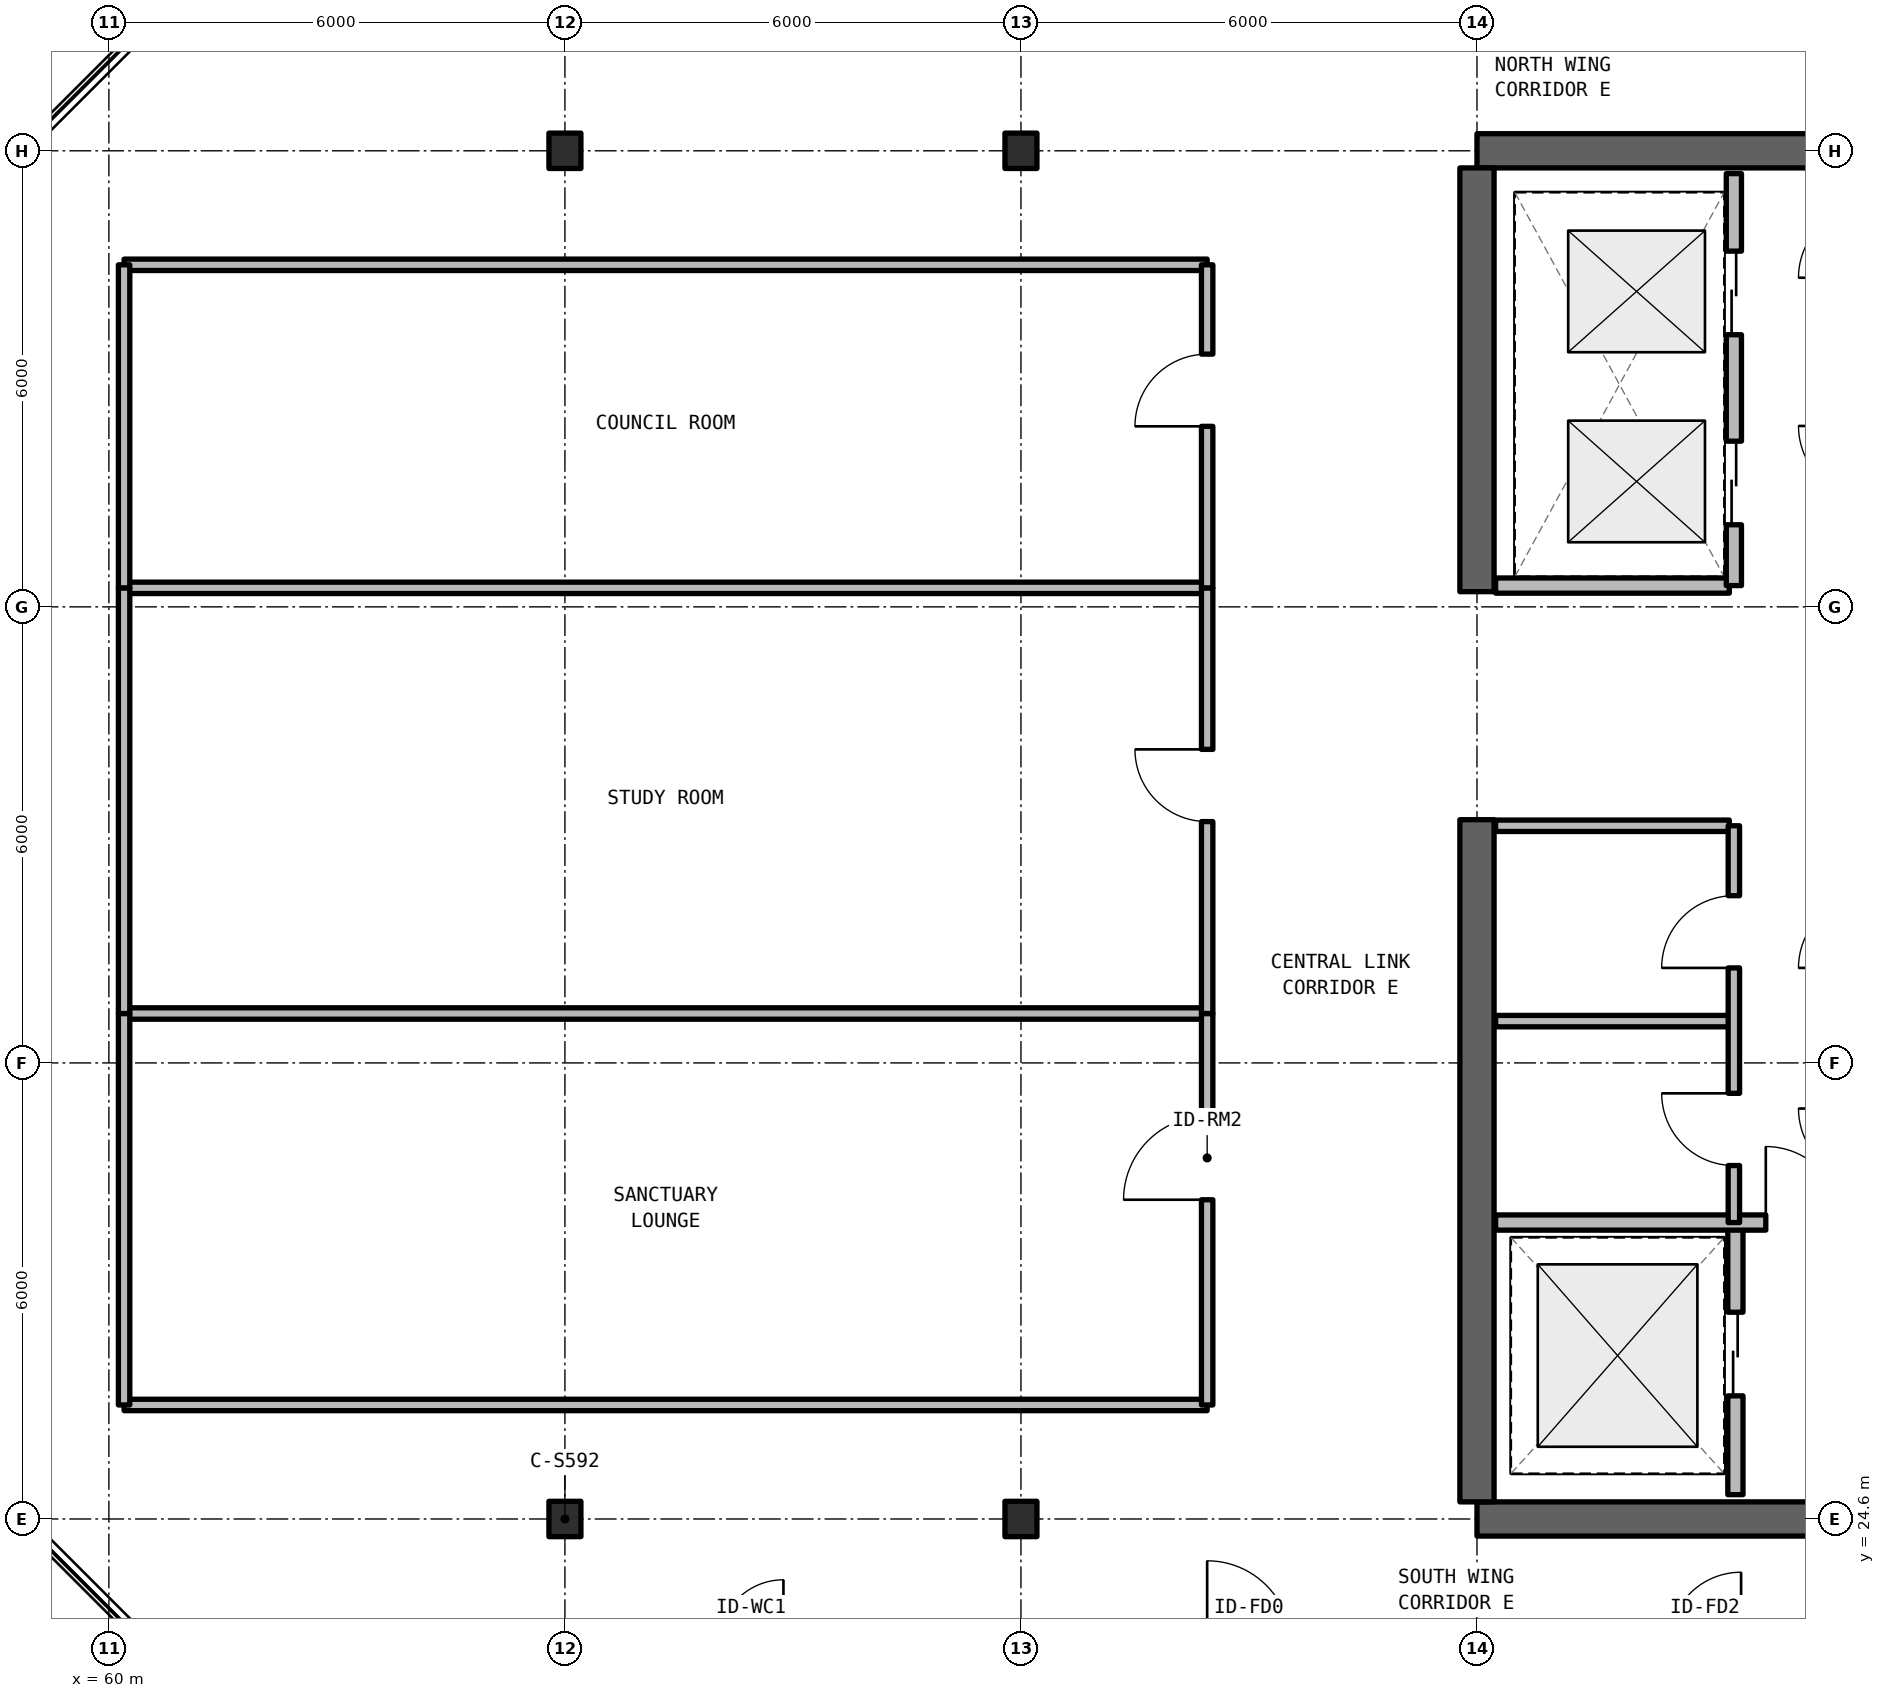
"""IFC4 building model, lengths in metres.
Left out: names, types, materials, properties, quantities, classifications, styles, units other than length and angle.
Written with IfcOpenShell. Run it as: python <this file> out.ifc"""

import sys

from ifc_helpers import new_model, si_unit, direction, frame, frame_2d, origin, origin_2d, place, context, subcontext, project, spatial, rectangle, i_section, extrude, element, fill, save


model = new_model("IFC4")
c1 = context("Model", 3, precision=1e-05, world=origin(), true_north=direction((0.0, 1.0)))
c2 = subcontext(c1, "Body", "Model", "MODEL_VIEW")
j1 = project(units=[si_unit("LENGTHUNIT", "METRE"), si_unit("PLANEANGLEUNIT", "RADIAN")], contexts=[c1])
p1 = place(None, origin())
s1 = spatial("IfcSite", under=j1, at=p1, CompositionType="ELEMENT")
p2 = place(p1, origin())
s2 = spatial("IfcBuilding", under=s1, at=p2, CompositionType="ELEMENT")
p3 = place(p2, frame((0.0, 0.0, 267.96)))
s3 = spatial("IfcBuildingStorey", under=s2, at=p3, CompositionType="ELEMENT", Elevation=267.96)
for number, where, z_axis, x_axis in (
    (1, (78.0, 24.6, 0.0), (0.0, 0.0, 1.0), (1.0, 0.0, 0.0)),
    (2, (90.0, 42.6, 0.0), (0.0, 0.0, 1.0), (-1.0, 0.0, 0.0)),
):
    element("IfcWall", number, at=place(p3, frame(where, z_axis=z_axis, x_axis=x_axis)), inside=s3, PredefinedType="SHEAR", context=c2, shape_type="SweptSolid", body=[
        extrude(rectangle(XDim=12.0, YDim=0.45, at=frame_2d((6.0, 0.0))), origin(), (0.0, 0.0, 1.0), 3.63),
    ])
p4 = place(p3, frame((78.0, 24.825, 0.0), z_axis=(0.0, 0.0, 1.0), x_axis=(0.0, 1.0, 0.0)))
e3 = element("IfcWall", 3, at=p4, inside=s3, PredefinedType="SHEAR", context=c2, shape_type="SweptSolid", body=[
    extrude(rectangle(XDim=8.975, YDim=0.45, at=frame_2d((4.488, 0.0))), origin(), (0.0, 0.0, 1.0), 3.63),
])
p5 = place(p3, frame((78.0, 36.8, 0.0), z_axis=(0.0, 0.0, 1.0), x_axis=(0.0, 1.0, 0.0)))
e4 = element("IfcWall", 4, at=p5, inside=s3, PredefinedType="SHEAR", context=c2, shape_type="SweptSolid", body=[
    extrude(rectangle(XDim=5.575, YDim=0.45, at=frame_2d((2.788, 0.0))), origin(), (0.0, 0.0, 1.0), 3.63),
])
for number, where, z_axis, x_axis in (
    (5, (66.0, 24.6, 0.0), (0.0, 0.0, 1.0), (1.0, 0.0, 0.0)),
    (6, (66.0, 42.6, 0.0), (0.0, 0.0, 1.0), (1.0, 0.0, 0.0)),
    (7, (72.0, 24.6, 0.0), (0.0, 0.0, 1.0), (1.0, 0.0, 0.0)),
    (8, (72.0, 42.6, 0.0), (0.0, 0.0, 1.0), (1.0, 0.0, 0.0)),
):
    element("IfcColumn", number, at=place(p3, frame(where, z_axis=z_axis, x_axis=x_axis)), inside=s3, PredefinedType="COLUMN", context=c2, shape_type="SweptSolid", body=[
        extrude(i_section(OverallWidth=0.421, OverallDepth=0.465, WebThickness=0.045, FlangeThickness=0.07, FilletRadius=0.015, at=origin_2d()), origin(), (0.0, 0.0, 1.0), 3.63),
    ])
p6 = place(p3, frame((81.4, 24.92, 0.0), z_axis=(0.0, 0.0, 1.0), x_axis=(0.0, 1.0, 0.0)))
e9 = element("IfcWall", 9, at=p6, inside=s3, PredefinedType="SOLIDWALL", context=c2, shape_type="SweptSolid", body=[
    extrude(rectangle(XDim=3.58, YDim=0.2, at=frame_2d((1.79, 0.0))), origin(), (0.0, 0.0, 1.0), 2.63),
])
p7 = place(p6, frame((1.3, 0.0, 0.0)))
e10 = element("IfcOpeningElement", 10, at=p7, cuts=e9, PredefinedType="OPENING", context=c2, shape_type="SweptSolid", body=[
    extrude(rectangle(XDim=1.1, YDim=2.2, at=frame_2d((0.55, 1.1))), frame((0.0, 0.11, 0.0), z_axis=(0.0, -1.0, 0.0), x_axis=(1.0, 0.0, 0.0)), (0.0, 0.0, 1.0), 0.22),
])
p8 = place(p3, frame((78.245, 28.5, 0.0), z_axis=(0.0, 0.0, 1.0), x_axis=(1.0, 0.0, 0.0)))
e11 = element("IfcWall", 11, at=p8, inside=s3, PredefinedType="SOLIDWALL", context=c2, shape_type="SweptSolid", body=[
    extrude(rectangle(XDim=7.585, YDim=0.2, at=frame_2d((3.792, 0.0))), origin(), (0.0, 0.0, 1.0), 2.63),
])
p9 = place(p8, frame((3.555, 0.0, 0.0)))
e12 = element("IfcOpeningElement", 12, at=p9, cuts=e11, PredefinedType="OPENING", context=c2, shape_type="SweptSolid", body=[
    extrude(rectangle(XDim=1.0, YDim=2.15, at=frame_2d((0.5, 1.075))), frame((0.0, 0.11, 0.0), z_axis=(0.0, -1.0, 0.0), x_axis=(1.0, 0.0, 0.0)), (0.0, 0.0, 1.0), 0.22),
])
for number, where, z_axis, x_axis in (
    (13, (78.245, 31.15, 0.0), (0.0, 0.0, 1.0), (1.0, 0.0, 0.0)),
    (14, (78.245, 33.72, 0.0), (0.0, 0.0, 1.0), (1.0, 0.0, 0.0)),
):
    element("IfcWall", number, at=place(p3, frame(where, z_axis=z_axis, x_axis=x_axis)), inside=s3, PredefinedType="SOLIDWALL", context=c2, shape_type="SweptSolid", body=[
        extrude(rectangle(XDim=3.075, YDim=0.15, at=frame_2d((1.538, 0.0))), origin(), (0.0, 0.0, 1.0), 2.63),
    ])
p10 = place(p3, frame((81.38, 28.5, 0.0), z_axis=(0.0, 0.0, 1.0), x_axis=(0.0, 1.0, 0.0)))
e15 = element("IfcWall", 15, at=p10, inside=s3, PredefinedType="SOLIDWALL", context=c2, shape_type="SweptSolid", body=[
    extrude(rectangle(XDim=5.22, YDim=0.15, at=frame_2d((2.61, 0.0))), origin(), (0.0, 0.0, 1.0), 2.63),
])
p11 = place(p10, frame((0.75, 0.0, 0.0)))
e16 = element("IfcOpeningElement", 16, at=p11, cuts=e15, PredefinedType="OPENING", context=c2, shape_type="SweptSolid", body=[
    extrude(rectangle(XDim=0.95, YDim=2.15, at=frame_2d((0.475, 1.075))), frame((0.0, 0.085, 0.0), z_axis=(0.0, -1.0, 0.0), x_axis=(1.0, 0.0, 0.0)), (0.0, 0.0, 1.0), 0.17),
])
p12 = place(p10, frame((3.35, 0.0, 0.0)))
e17 = element("IfcOpeningElement", 17, at=p12, cuts=e15, PredefinedType="OPENING", context=c2, shape_type="SweptSolid", body=[
    extrude(rectangle(XDim=0.95, YDim=2.15, at=frame_2d((0.475, 1.075))), frame((0.0, 0.085, 0.0), z_axis=(0.0, -1.0, 0.0), x_axis=(1.0, 0.0, 0.0)), (0.0, 0.0, 1.0), 0.17),
])
p13 = place(p3, frame((78.245, 36.88, 0.0), z_axis=(0.0, 0.0, 1.0), x_axis=(1.0, 0.0, 0.0)))
e18 = element("IfcWall", 18, at=p13, inside=s3, PredefinedType="SOLIDWALL", context=c2, shape_type="SweptSolid", body=[
    extrude(rectangle(XDim=3.075, YDim=0.2, at=frame_2d((1.538, 0.0))), origin(), (0.0, 0.0, 1.0), 2.63),
])
p14 = place(p3, frame((81.38, 36.88, 0.0), z_axis=(0.0, 0.0, 1.0), x_axis=(0.0, 1.0, 0.0)))
e19 = element("IfcWall", 19, at=p14, inside=s3, PredefinedType="SOLIDWALL", context=c2, shape_type="SweptSolid", body=[
    extrude(rectangle(XDim=5.42, YDim=0.2, at=frame_2d((2.71, 0.0))), origin(), (0.0, 0.0, 1.0), 2.63),
])
p15 = place(p14, frame((0.8, 0.0, 0.0)))
e20 = element("IfcOpeningElement", 20, at=p15, cuts=e19, PredefinedType="OPENING", context=c2, shape_type="SweptSolid", body=[
    extrude(rectangle(XDim=1.1, YDim=2.2, at=frame_2d((0.55, 1.1))), frame((0.0, 0.11, 0.0), z_axis=(0.0, -1.0, 0.0), x_axis=(1.0, 0.0, 0.0)), (0.0, 0.0, 1.0), 0.22),
])
p16 = place(p14, frame((3.3, 0.0, 0.0)))
e21 = element("IfcOpeningElement", 21, at=p16, cuts=e19, PredefinedType="OPENING", context=c2, shape_type="SweptSolid", body=[
    extrude(rectangle(XDim=1.1, YDim=2.2, at=frame_2d((0.55, 1.1))), frame((0.0, 0.11, 0.0), z_axis=(0.0, -1.0, 0.0), x_axis=(1.0, 0.0, 0.0)), (0.0, 0.0, 1.0), 0.22),
])
for number, where, z_axis, x_axis in (
    (22, (60.2, 26.1, 0.0), (0.0, 0.0, 1.0), (1.0, 0.0, 0.0)),
    (23, (60.2, 31.25, 0.0), (0.0, 0.0, 1.0), (1.0, 0.0, 0.0)),
):
    element("IfcWall", number, at=place(p3, frame(where, z_axis=z_axis, x_axis=x_axis)), inside=s3, PredefinedType="SOLIDWALL", context=c2, shape_type="SweptSolid", body=[
        extrude(rectangle(XDim=14.25, YDim=0.15, at=frame_2d((7.125, 0.0))), origin(), (0.0, 0.0, 1.0), 2.63),
    ])
p17 = place(p3, frame((60.2, 26.1, 0.0), z_axis=(0.0, 0.0, 1.0), x_axis=(0.0, 1.0, 0.0)))
e24 = element("IfcWall", 24, at=p17, inside=s3, PredefinedType="SOLIDWALL", context=c2, shape_type="SweptSolid", body=[
    extrude(rectangle(XDim=5.15, YDim=0.15, at=frame_2d((2.575, 0.0))), origin(), (0.0, 0.0, 1.0), 2.63),
])
p18 = place(p3, frame((74.45, 26.1, 0.0), z_axis=(0.0, 0.0, 1.0), x_axis=(0.0, 1.0, 0.0)))
e25 = element("IfcWall", 25, at=p18, inside=s3, PredefinedType="SOLIDWALL", context=c2, shape_type="SweptSolid", body=[
    extrude(rectangle(XDim=5.15, YDim=0.15, at=frame_2d((2.575, 0.0))), origin(), (0.0, 0.0, 1.0), 2.63),
])
p19 = place(p18, frame((2.7, 0.0, 0.0)))
e26 = element("IfcOpeningElement", 26, at=p19, cuts=e25, PredefinedType="OPENING", context=c2, shape_type="SweptSolid", body=[
    extrude(rectangle(XDim=1.1, YDim=2.15, at=frame_2d((0.55, 1.075))), frame((0.0, 0.085, 0.0), z_axis=(0.0, -1.0, 0.0), x_axis=(1.0, 0.0, 0.0)), (0.0, 0.0, 1.0), 0.17),
])
p20 = place(p3, frame((60.2, 36.85, 0.0), z_axis=(0.0, 0.0, 1.0), x_axis=(1.0, 0.0, 0.0)))
e27 = element("IfcWall", 27, at=p20, inside=s3, PredefinedType="SOLIDWALL", context=c2, shape_type="SweptSolid", body=[
    extrude(rectangle(XDim=14.25, YDim=0.15, at=frame_2d((7.125, 0.0))), origin(), (0.0, 0.0, 1.0), 2.63),
])
p21 = place(p3, frame((60.2, 31.25, 0.0), z_axis=(0.0, 0.0, 1.0), x_axis=(0.0, 1.0, 0.0)))
e28 = element("IfcWall", 28, at=p21, inside=s3, PredefinedType="SOLIDWALL", context=c2, shape_type="SweptSolid", body=[
    extrude(rectangle(XDim=5.6, YDim=0.15, at=frame_2d((2.8, 0.0))), origin(), (0.0, 0.0, 1.0), 2.63),
])
p22 = place(p3, frame((74.45, 31.25, 0.0), z_axis=(0.0, 0.0, 1.0), x_axis=(0.0, 1.0, 0.0)))
e29 = element("IfcWall", 29, at=p22, inside=s3, PredefinedType="SOLIDWALL", context=c2, shape_type="SweptSolid", body=[
    extrude(rectangle(XDim=5.6, YDim=0.15, at=frame_2d((2.8, 0.0))), origin(), (0.0, 0.0, 1.0), 2.63),
])
p23 = place(p22, frame((2.525, 0.0, 0.0)))
e30 = element("IfcOpeningElement", 30, at=p23, cuts=e29, PredefinedType="OPENING", context=c2, shape_type="SweptSolid", body=[
    extrude(rectangle(XDim=0.95, YDim=2.15, at=frame_2d((0.475, 1.075))), frame((0.0, 0.085, 0.0), z_axis=(0.0, -1.0, 0.0), x_axis=(1.0, 0.0, 0.0)), (0.0, 0.0, 1.0), 0.17),
])
p24 = place(p3, frame((60.2, 41.1, 0.0), z_axis=(0.0, 0.0, 1.0), x_axis=(1.0, 0.0, 0.0)))
e31 = element("IfcWall", 31, at=p24, inside=s3, PredefinedType="SOLIDWALL", context=c2, shape_type="SweptSolid", body=[
    extrude(rectangle(XDim=14.25, YDim=0.15, at=frame_2d((7.125, 0.0))), origin(), (0.0, 0.0, 1.0), 2.63),
])
p25 = place(p3, frame((60.2, 36.85, 0.0), z_axis=(0.0, 0.0, 1.0), x_axis=(0.0, 1.0, 0.0)))
e32 = element("IfcWall", 32, at=p25, inside=s3, PredefinedType="SOLIDWALL", context=c2, shape_type="SweptSolid", body=[
    extrude(rectangle(XDim=4.25, YDim=0.15, at=frame_2d((2.125, 0.0))), origin(), (0.0, 0.0, 1.0), 2.63),
])
p26 = place(p3, frame((74.45, 36.85, 0.0), z_axis=(0.0, 0.0, 1.0), x_axis=(0.0, 1.0, 0.0)))
e33 = element("IfcWall", 33, at=p26, inside=s3, PredefinedType="SOLIDWALL", context=c2, shape_type="SweptSolid", body=[
    extrude(rectangle(XDim=4.25, YDim=0.15, at=frame_2d((2.125, 0.0))), origin(), (0.0, 0.0, 1.0), 2.63),
])
p27 = place(p26, frame((2.125, 0.0, 0.0)))
e34 = element("IfcOpeningElement", 34, at=p27, cuts=e33, PredefinedType="OPENING", context=c2, shape_type="SweptSolid", body=[
    extrude(rectangle(XDim=0.95, YDim=2.15, at=frame_2d((0.475, 1.075))), frame((0.0, 0.085, 0.0), z_axis=(0.0, -1.0, 0.0), x_axis=(1.0, 0.0, 0.0)), (0.0, 0.0, 1.0), 0.17),
])
p28 = place(p7, origin())
e35 = element("IfcDoor", 35, at=p28, inside=s3, OperationType="SLIDING_TO_LEFT", PredefinedType="DOOR", context=c2, shape_type="SweptSolid", body=[
    extrude(rectangle(XDim=1.1, YDim=2.2, at=frame_2d((0.55, 1.1))), frame((0.0, 0.025, 0.0), z_axis=(0.0, -1.0, 0.0), x_axis=(1.0, 0.0, 0.0)), (0.0, 0.0, 1.0), 0.05),
])
fill(e10, e35)
p29 = place(p9, origin())
e36 = element("IfcDoor", 36, at=p29, inside=s3, OperationType="SINGLE_SWING_LEFT", PredefinedType="DOOR", context=c2, shape_type="SweptSolid", body=[
    extrude(rectangle(XDim=1.0, YDim=2.15, at=frame_2d((0.5, 1.075))), frame((0.0, 0.025, 0.0), z_axis=(0.0, -1.0, 0.0), x_axis=(1.0, 0.0, 0.0)), (0.0, 0.0, 1.0), 0.05),
])
fill(e12, e36)
p30 = place(p11, origin())
e37 = element("IfcDoor", 37, at=p30, inside=s3, OperationType="SINGLE_SWING_RIGHT", PredefinedType="DOOR", context=c2, shape_type="SweptSolid", body=[
    extrude(rectangle(XDim=0.95, YDim=2.15, at=frame_2d((0.475, 1.075))), frame((0.0, 0.025, 0.0), z_axis=(0.0, -1.0, 0.0), x_axis=(1.0, 0.0, 0.0)), (0.0, 0.0, 1.0), 0.05),
])
fill(e16, e37)
p31 = place(p12, origin())
e38 = element("IfcDoor", 38, at=p31, inside=s3, OperationType="SINGLE_SWING_LEFT", PredefinedType="DOOR", context=c2, shape_type="SweptSolid", body=[
    extrude(rectangle(XDim=0.95, YDim=2.15, at=frame_2d((0.475, 1.075))), frame((0.0, 0.025, 0.0), z_axis=(0.0, -1.0, 0.0), x_axis=(1.0, 0.0, 0.0)), (0.0, 0.0, 1.0), 0.05),
])
fill(e17, e38)
p32 = place(p15, origin())
e39 = element("IfcDoor", 39, at=p32, inside=s3, OperationType="SLIDING_TO_LEFT", PredefinedType="DOOR", context=c2, shape_type="SweptSolid", body=[
    extrude(rectangle(XDim=1.1, YDim=2.2, at=frame_2d((0.55, 1.1))), frame((0.0, 0.025, 0.0), z_axis=(0.0, -1.0, 0.0), x_axis=(1.0, 0.0, 0.0)), (0.0, 0.0, 1.0), 0.05),
])
fill(e20, e39)
p33 = place(p16, origin())
e40 = element("IfcDoor", 40, at=p33, inside=s3, OperationType="SLIDING_TO_RIGHT", PredefinedType="DOOR", context=c2, shape_type="SweptSolid", body=[
    extrude(rectangle(XDim=1.1, YDim=2.2, at=frame_2d((0.55, 1.1))), frame((0.0, 0.025, 0.0), z_axis=(0.0, -1.0, 0.0), x_axis=(1.0, 0.0, 0.0)), (0.0, 0.0, 1.0), 0.05),
])
fill(e21, e40)
p34 = place(p19, origin())
e41 = element("IfcDoor", 41, at=p34, inside=s3, OperationType="SINGLE_SWING_LEFT", PredefinedType="DOOR", context=c2, shape_type="SweptSolid", body=[
    extrude(rectangle(XDim=1.1, YDim=2.15, at=frame_2d((0.55, 1.075))), frame((0.0, 0.025, 0.0), z_axis=(0.0, -1.0, 0.0), x_axis=(1.0, 0.0, 0.0)), (0.0, 0.0, 1.0), 0.05),
])
fill(e26, e41)
p35 = place(p23, origin())
e42 = element("IfcDoor", 42, at=p35, inside=s3, OperationType="SINGLE_SWING_RIGHT", PredefinedType="DOOR", context=c2, shape_type="SweptSolid", body=[
    extrude(rectangle(XDim=0.95, YDim=2.15, at=frame_2d((0.475, 1.075))), frame((0.0, 0.025, 0.0), z_axis=(0.0, -1.0, 0.0), x_axis=(1.0, 0.0, 0.0)), (0.0, 0.0, 1.0), 0.05),
])
fill(e30, e42)
p36 = place(p27, origin())
e43 = element("IfcDoor", 43, at=p36, inside=s3, OperationType="SINGLE_SWING_LEFT", PredefinedType="DOOR", context=c2, shape_type="SweptSolid", body=[
    extrude(rectangle(XDim=0.95, YDim=2.15, at=frame_2d((0.475, 1.075))), frame((0.0, 0.025, 0.0), z_axis=(0.0, -1.0, 0.0), x_axis=(1.0, 0.0, 0.0)), (0.0, 0.0, 1.0), 0.05),
])
fill(e34, e43)
save(model, sys.argv[1])
